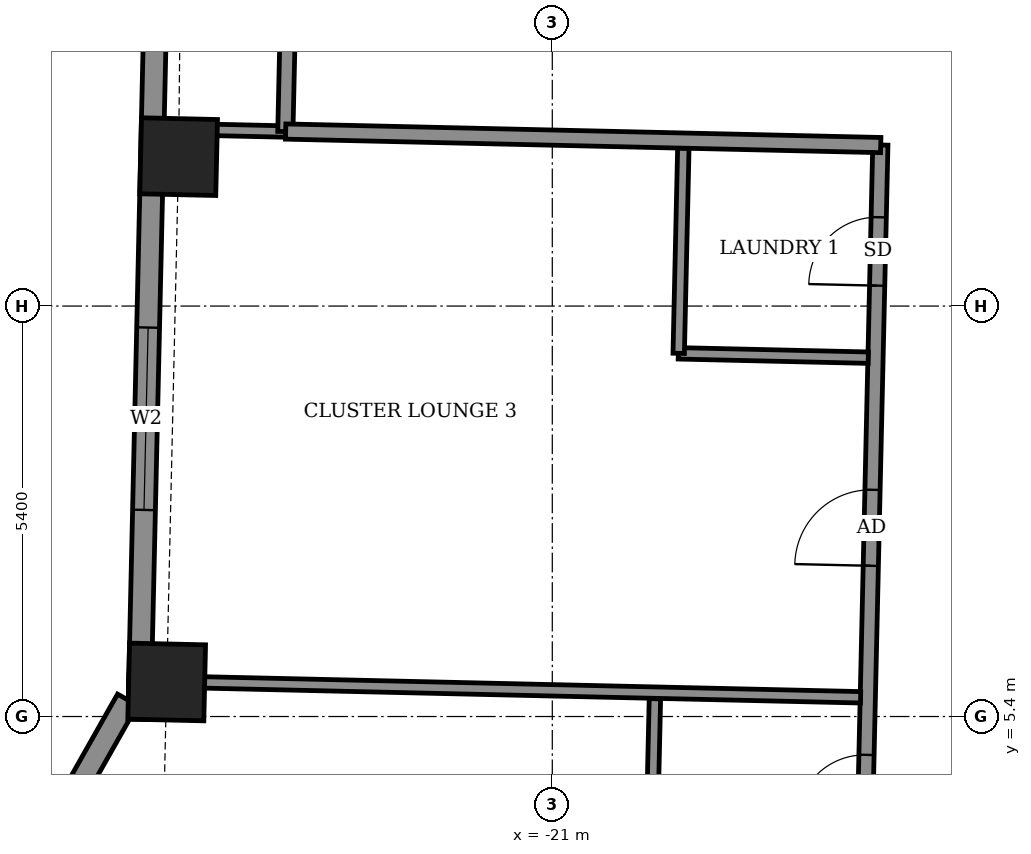
"""IFC4 building model, lengths in metres.
Left out: names, types, materials, properties, quantities, classifications, styles, units other than length and angle.
Written with IfcOpenShell. Run it as: python <this file> out.ifc"""

import sys

from ifc_helpers import new_model, si_unit, direction, frame, frame_2d, origin, origin_2d, place, context, subcontext, project, spatial, rectangle, extrude, element, fill, save


model = new_model("IFC4")
c1 = context("Model", 3, precision=1e-05, world=origin(), true_north=direction((0.0, 1.0)))
c2 = subcontext(c1, "Body", "Model", "MODEL_VIEW")
j1 = project(units=[si_unit("LENGTHUNIT", "METRE"), si_unit("PLANEANGLEUNIT", "RADIAN")], contexts=[c1])
p1 = place(None, origin())
s1 = spatial("IfcSite", under=j1, at=p1, CompositionType="ELEMENT")
p2 = place(p1, origin())
s2 = spatial("IfcBuilding", under=s1, at=p2, CompositionType="ELEMENT")
p3 = place(p2, frame((0.0, 0.0, 257.3)))
s3 = spatial("IfcBuildingStorey", under=s2, at=p3, CompositionType="ELEMENT", Elevation=257.3)
for number, where, z_axis, x_axis in (
    (1, (-25.916, 12.766, -0.55), (0.0, 0.0, 1.0), (-0.023, -1.0, 0.0)),
    (2, (-26.073, 5.855, -0.55), (0.0, 0.0, 1.0), (-0.023, -1.0, 0.0)),
):
    element("IfcColumn", number, at=place(p3, frame(where, z_axis=z_axis, x_axis=x_axis)), inside=s3, PredefinedType="COLUMN", context=c2, shape_type="SweptSolid", body=[
        extrude(rectangle(XDim=1.0, YDim=1.0, at=origin_2d()), origin(), (0.0, 0.0, 1.0), 3.6),
    ])
p4 = place(p3, frame((-26.113, 19.534, 0.0), z_axis=(0.0, 0.0, 1.0), x_axis=(-0.022649415303, -0.999743469089, 0.0)))
e3 = element("IfcWall", 3, at=p4, inside=s3, PredefinedType="SOLIDWALL", context=c2, shape_type="SweptSolid", body=[
    extrude(rectangle(XDim=14.175, YDim=0.3, at=frame_2d((7.087, 0.0))), origin(), (0.0, 0.0, 1.0), 2.55),
])
p5 = place(p4, frame((2.735, 0.0, 0.0)))
e4 = element("IfcOpeningElement", 4, at=p5, cuts=e3, PredefinedType="OPENING", context=c2, shape_type="SweptSolid", body=[
    extrude(rectangle(XDim=1.5, YDim=2.4, at=frame_2d((0.75, 1.2))), frame((0.0, 0.16, 0.0), z_axis=(0.0, -1.0, 0.0), x_axis=(1.0, 0.0, 0.0)), (0.0, 0.0, 1.0), 0.32),
])
p6 = place(p4, frame((9.019, 0.0, 0.9)))
e5 = element("IfcOpeningElement", 5, at=p6, cuts=e3, PredefinedType="OPENING", context=c2, shape_type="SweptSolid", body=[
    extrude(rectangle(XDim=2.4, YDim=1.5, at=frame_2d((1.2, 0.75))), frame((0.0, 0.16, 0.0), z_axis=(0.0, -1.0, 0.0), x_axis=(1.0, 0.0, 0.0)), (0.0, 0.0, 1.0), 0.32),
])
p7 = place(p3, frame((-26.589, 5.621, 0.0), z_axis=(0.0, 0.0, 1.0), x_axis=(-0.492495436053, -0.870315026566, 0.0)))
e6 = element("IfcWall", 6, at=p7, inside=s3, PredefinedType="SOLIDWALL", context=c2, shape_type="SweptSolid", body=[
    extrude(rectangle(XDim=5.397, YDim=0.3, at=frame_2d((2.698, 0.0))), origin(), (0.0, 0.0, 1.0), 3.05),
])
p8 = place(p7, frame((2.007, 0.0, 0.9)))
e7 = element("IfcOpeningElement", 7, at=p8, cuts=e6, PredefinedType="OPENING", context=c2, shape_type="SweptSolid", body=[
    extrude(rectangle(XDim=1.2, YDim=1.5, at=frame_2d((0.6, 0.75))), frame((0.0, 0.16, 0.0), z_axis=(0.0, -1.0, 0.0), x_axis=(1.0, 0.0, 0.0)), (0.0, 0.0, 1.0), 0.32),
])
p9 = place(p3, frame((-17.262, -12.525, 0.0), z_axis=(0.0, 0.0, 1.0), x_axis=(0.022706151961, 0.999742182097, 0.0)))
e8 = element("IfcWall", 8, at=p9, inside=s3, PredefinedType="PARTITIONING", context=c2, shape_type="SweptSolid", body=[
    extrude(rectangle(XDim=25.45, YDim=0.2, at=frame_2d((12.725, 0.0))), origin(), (0.0, 0.0, 1.0), 3.05),
])
p10 = place(p9, frame((19.913, 0.0, 0.0)))
e9 = element("IfcOpeningElement", 9, at=p10, cuts=e8, PredefinedType="OPENING", context=c2, shape_type="SweptSolid", body=[
    extrude(rectangle(XDim=1.0, YDim=2.1, at=frame_2d((0.5, 1.05))), frame((0.0, 0.11, 0.0), z_axis=(0.0, -1.0, 0.0), x_axis=(1.0, 0.0, 0.0)), (0.0, 0.0, 1.0), 0.22),
])
p11 = place(p9, frame((23.6, 0.0, 0.0)))
e10 = element("IfcOpeningElement", 10, at=p11, cuts=e8, PredefinedType="OPENING", context=c2, shape_type="SweptSolid", body=[
    extrude(rectangle(XDim=0.9, YDim=2.1, at=frame_2d((0.45, 1.05))), frame((0.0, 0.11, 0.0), z_axis=(0.0, -1.0, 0.0), x_axis=(1.0, 0.0, 0.0)), (0.0, 0.0, 1.0), 0.22),
])
p12 = place(p9, frame((14.05, 0.0, 0.0)))
e11 = element("IfcOpeningElement", 11, at=p12, cuts=e8, PredefinedType="OPENING", context=c2, shape_type="SweptSolid", body=[
    extrude(rectangle(XDim=1.0, YDim=2.1, at=frame_2d((0.5, 1.05))), frame((0.0, 0.11, 0.0), z_axis=(0.0, -1.0, 0.0), x_axis=(1.0, 0.0, 0.0)), (0.0, 0.0, 1.0), 0.22),
])
p13 = place(p9, frame((16.525, 0.0, 0.0)))
e12 = element("IfcOpeningElement", 12, at=p13, cuts=e8, PredefinedType="OPENING", context=c2, shape_type="SweptSolid", body=[
    extrude(rectangle(XDim=0.9, YDim=2.1, at=frame_2d((0.45, 1.05))), frame((0.0, 0.11, 0.0), z_axis=(0.0, -1.0, 0.0), x_axis=(1.0, 0.0, 0.0)), (0.0, 0.0, 1.0), 0.22),
])
p14 = place(p9, frame((11.825, 0.0, 0.0)))
e13 = element("IfcOpeningElement", 13, at=p14, cuts=e8, PredefinedType="OPENING", context=c2, shape_type="SweptSolid", body=[
    extrude(rectangle(XDim=1.0, YDim=2.1, at=frame_2d((0.5, 1.05))), frame((0.0, 0.11, 0.0), z_axis=(0.0, -1.0, 0.0), x_axis=(1.0, 0.0, 0.0)), (0.0, 0.0, 1.0), 0.22),
])
p15 = place(p9, frame((9.575, 0.0, 0.0)))
e14 = element("IfcOpeningElement", 14, at=p15, cuts=e8, PredefinedType="OPENING", context=c2, shape_type="SweptSolid", body=[
    extrude(rectangle(XDim=0.9, YDim=2.1, at=frame_2d((0.45, 1.05))), frame((0.0, 0.11, 0.0), z_axis=(0.0, -1.0, 0.0), x_axis=(1.0, 0.0, 0.0)), (0.0, 0.0, 1.0), 0.22),
])
p16 = place(p9, frame((6.155, 0.0, 0.0)))
e15 = element("IfcOpeningElement", 15, at=p16, cuts=e8, PredefinedType="OPENING", context=c2, shape_type="SweptSolid", body=[
    extrude(rectangle(XDim=1.0, YDim=2.1, at=frame_2d((0.5, 1.05))), frame((0.0, 0.11, 0.0), z_axis=(0.0, -1.0, 0.0), x_axis=(1.0, 0.0, 0.0)), (0.0, 0.0, 1.0), 0.22),
])
p17 = place(p9, frame((0.512, 0.0, 0.0)))
e16 = element("IfcOpeningElement", 16, at=p17, cuts=e8, PredefinedType="OPENING", context=c2, shape_type="SweptSolid", body=[
    extrude(rectangle(XDim=1.0, YDim=2.1, at=frame_2d((0.5, 1.05))), frame((0.0, 0.11, 0.0), z_axis=(0.0, -1.0, 0.0), x_axis=(1.0, 0.0, 0.0)), (0.0, 0.0, 1.0), 0.22),
])
p18 = place(p9, frame((2.775, 0.0, 0.0)))
e17 = element("IfcOpeningElement", 17, at=p18, cuts=e8, PredefinedType="OPENING", context=c2, shape_type="SweptSolid", body=[
    extrude(rectangle(XDim=0.9, YDim=2.1, at=frame_2d((0.45, 1.05))), frame((0.0, 0.11, 0.0), z_axis=(0.0, -1.0, 0.0), x_axis=(1.0, 0.0, 0.0)), (0.0, 0.0, 1.0), 0.22),
])
p19 = place(p3, frame((-19.703, 3.31, 0.0), z_axis=(0.0, 0.0, 1.0), x_axis=(0.02279059109, 0.999740260747, 0.0)))
e18 = element("IfcWall", 18, at=p19, inside=s3, PredefinedType="PARTITIONING", context=c2, shape_type="SweptSolid", body=[
    extrude(rectangle(XDim=2.324, YDim=0.15, at=frame_2d((1.162, 0.0))), origin(), (0.0, 0.0, 1.0), 3.05),
])
p20 = place(p3, frame((-26.573, 5.871, 0.0), z_axis=(0.0, 0.0, 1.0), x_axis=(0.999743768709, -0.022636186244, 0.0)))
e19 = element("IfcWall", 19, at=p20, inside=s3, PredefinedType="PARTITIONING", context=c2, shape_type="SweptSolid", body=[
    extrude(rectangle(XDim=9.631, YDim=0.15, at=frame_2d((4.816, 0.0))), origin(), (0.0, 0.0, 1.0), 3.05),
])
p21 = place(p3, frame((-19.342, 10.178, 0.0), z_axis=(0.0, 0.0, 1.0), x_axis=(0.999741028149, -0.022756903044, 0.0)))
e20 = element("IfcWall", 20, at=p21, inside=s3, PredefinedType="PARTITIONING", context=c2, shape_type="SweptSolid", body=[
    extrude(rectangle(XDim=2.5, YDim=0.15, at=frame_2d((1.25, 0.0))), origin(), (0.0, 0.0, 1.0), 3.05),
])
p22 = place(p3, frame((-19.337, 10.178, 0.0), z_axis=(0.0, 0.0, 1.0), x_axis=(0.02260842146, 0.999744396973, 0.0)))
e21 = element("IfcWall", 21, at=p22, inside=s3, PredefinedType="PARTITIONING", context=c2, shape_type="SweptSolid", body=[
    extrude(rectangle(XDim=2.7, YDim=0.15, at=frame_2d((1.35, 0.0))), origin(), (0.0, 0.0, 1.0), 3.05),
])
p23 = place(p3, frame((-26.108, 13.132, 0.0), z_axis=(0.0, 0.0, 1.0), x_axis=(0.999746371854, -0.022520922836, 0.0)))
e22 = element("IfcWall", 22, at=p23, inside=s3, PredefinedType="PARTITIONING", context=c2, shape_type="SweptSolid", body=[
    extrude(rectangle(XDim=1.604, YDim=0.15, at=frame_2d((0.802, 0.0))), origin(), (0.0, 0.0, 1.0), 3.05),
])
p24 = place(p3, frame((-24.512, 13.096, 0.0), z_axis=(0.0, 0.0, 1.0), x_axis=(0.022617910375, 0.999744182344, 0.0)))
e23 = element("IfcWall", 23, at=p24, inside=s3, PredefinedType="PARTITIONING", context=c2, shape_type="SweptSolid", body=[
    extrude(rectangle(XDim=1.5, YDim=0.2, at=frame_2d((0.75, 0.0))), origin(), (0.0, 0.0, 1.0), 3.05),
])
p25 = place(p3, frame((-24.508, 13.096, 0.0), z_axis=(0.0, 0.0, 1.0), x_axis=(0.99974170677, -0.022727070732, 0.0)))
e24 = element("IfcWall", 24, at=p25, inside=s3, PredefinedType="PARTITIONING", context=c2, shape_type="SweptSolid", body=[
    extrude(rectangle(XDim=7.831, YDim=0.2, at=frame_2d((3.916, 0.0))), origin(), (0.0, 0.0, 1.0), 3.05),
])
p26 = place(p3, frame((-24.474, 14.596, 0.0), z_axis=(0.0, 0.0, 1.0), x_axis=(0.999742424031, -0.022695497208, 0.0)))
e25 = element("IfcWall", 25, at=p26, inside=s3, PredefinedType="PARTITIONING", context=c2, shape_type="SweptSolid", body=[
    extrude(rectangle(XDim=52.872, YDim=0.2, at=frame_2d((26.436, 0.0))), origin(), (0.0, 0.0, 1.0), 3.05),
])
p27 = place(p26, frame((51.336, 0.0, 0.0)))
e26 = element("IfcOpeningElement", 26, at=p27, cuts=e25, PredefinedType="OPENING", context=c2, shape_type="SweptSolid", body=[
    extrude(rectangle(XDim=1.0, YDim=2.1, at=frame_2d((0.5, 1.05))), frame((0.0, 0.11, 0.0), z_axis=(0.0, -1.0, 0.0), x_axis=(1.0, 0.0, 0.0)), (0.0, 0.0, 1.0), 0.22),
])
p28 = place(p26, frame((47.25, 0.0, 0.0)))
e27 = element("IfcOpeningElement", 27, at=p28, cuts=e25, PredefinedType="OPENING", context=c2, shape_type="SweptSolid", body=[
    extrude(rectangle(XDim=0.9, YDim=2.1, at=frame_2d((0.45, 1.05))), frame((0.0, 0.11, 0.0), z_axis=(0.0, -1.0, 0.0), x_axis=(1.0, 0.0, 0.0)), (0.0, 0.0, 1.0), 0.22),
])
p29 = place(p26, frame((42.475, 0.0, 0.0)))
e28 = element("IfcOpeningElement", 28, at=p29, cuts=e25, PredefinedType="OPENING", context=c2, shape_type="SweptSolid", body=[
    extrude(rectangle(XDim=0.9, YDim=2.1, at=frame_2d((0.45, 1.05))), frame((0.0, 0.11, 0.0), z_axis=(0.0, -1.0, 0.0), x_axis=(1.0, 0.0, 0.0)), (0.0, 0.0, 1.0), 0.22),
])
p30 = place(p26, frame((40.15, 0.0, 0.0)))
e29 = element("IfcOpeningElement", 29, at=p30, cuts=e25, PredefinedType="OPENING", context=c2, shape_type="SweptSolid", body=[
    extrude(rectangle(XDim=0.9, YDim=2.1, at=frame_2d((0.45, 1.05))), frame((0.0, 0.11, 0.0), z_axis=(0.0, -1.0, 0.0), x_axis=(1.0, 0.0, 0.0)), (0.0, 0.0, 1.0), 0.22),
])
p31 = place(p26, frame((33.15, 0.0, 0.0)))
e30 = element("IfcOpeningElement", 30, at=p31, cuts=e25, PredefinedType="OPENING", context=c2, shape_type="SweptSolid", body=[
    extrude(rectangle(XDim=0.9, YDim=2.1, at=frame_2d((0.45, 1.05))), frame((0.0, 0.11, 0.0), z_axis=(0.0, -1.0, 0.0), x_axis=(1.0, 0.0, 0.0)), (0.0, 0.0, 1.0), 0.22),
])
p32 = place(p26, frame((30.95, 0.0, 0.0)))
e31 = element("IfcOpeningElement", 31, at=p32, cuts=e25, PredefinedType="OPENING", context=c2, shape_type="SweptSolid", body=[
    extrude(rectangle(XDim=0.9, YDim=2.1, at=frame_2d((0.45, 1.05))), frame((0.0, 0.11, 0.0), z_axis=(0.0, -1.0, 0.0), x_axis=(1.0, 0.0, 0.0)), (0.0, 0.0, 1.0), 0.22),
])
p33 = place(p26, frame((23.975, 0.0, 0.0)))
e32 = element("IfcOpeningElement", 32, at=p33, cuts=e25, PredefinedType="OPENING", context=c2, shape_type="SweptSolid", body=[
    extrude(rectangle(XDim=0.9, YDim=2.1, at=frame_2d((0.45, 1.05))), frame((0.0, 0.11, 0.0), z_axis=(0.0, -1.0, 0.0), x_axis=(1.0, 0.0, 0.0)), (0.0, 0.0, 1.0), 0.22),
])
p34 = place(p26, frame((21.925, 0.0, 0.0)))
e33 = element("IfcOpeningElement", 33, at=p34, cuts=e25, PredefinedType="OPENING", context=c2, shape_type="SweptSolid", body=[
    extrude(rectangle(XDim=0.9, YDim=2.1, at=frame_2d((0.45, 1.05))), frame((0.0, 0.11, 0.0), z_axis=(0.0, -1.0, 0.0), x_axis=(1.0, 0.0, 0.0)), (0.0, 0.0, 1.0), 0.22),
])
p35 = place(p26, frame((14.975, 0.0, 0.0)))
e34 = element("IfcOpeningElement", 34, at=p35, cuts=e25, PredefinedType="OPENING", context=c2, shape_type="SweptSolid", body=[
    extrude(rectangle(XDim=0.9, YDim=2.1, at=frame_2d((0.45, 1.05))), frame((0.0, 0.11, 0.0), z_axis=(0.0, -1.0, 0.0), x_axis=(1.0, 0.0, 0.0)), (0.0, 0.0, 1.0), 0.22),
])
p36 = place(p26, frame((12.65, 0.0, 0.0)))
e35 = element("IfcOpeningElement", 35, at=p36, cuts=e25, PredefinedType="OPENING", context=c2, shape_type="SweptSolid", body=[
    extrude(rectangle(XDim=0.9, YDim=2.1, at=frame_2d((0.45, 1.05))), frame((0.0, 0.11, 0.0), z_axis=(0.0, -1.0, 0.0), x_axis=(1.0, 0.0, 0.0)), (0.0, 0.0, 1.0), 0.22),
])
p37 = place(p26, frame((2.0, 0.0, 0.0)))
e36 = element("IfcOpeningElement", 36, at=p37, cuts=e25, PredefinedType="OPENING", context=c2, shape_type="SweptSolid", body=[
    extrude(rectangle(XDim=1.0, YDim=2.1, at=frame_2d((0.5, 1.05))), frame((0.0, 0.11, 0.0), z_axis=(0.0, -1.0, 0.0), x_axis=(1.0, 0.0, 0.0)), (0.0, 0.0, 1.0), 0.22),
])
p38 = place(p26, frame((7.75, 0.0, 0.0)))
e37 = element("IfcOpeningElement", 37, at=p38, cuts=e25, PredefinedType="OPENING", context=c2, shape_type="SweptSolid", body=[
    extrude(rectangle(XDim=0.9, YDim=2.1, at=frame_2d((0.45, 1.05))), frame((0.0, 0.11, 0.0), z_axis=(0.0, -1.0, 0.0), x_axis=(1.0, 0.0, 0.0)), (0.0, 0.0, 1.0), 0.22),
])
p39 = place(p6, origin())
e38 = element("IfcWindow", 38, at=p39, inside=s3, PartitioningType="DOUBLE_PANEL_VERTICAL", PredefinedType="WINDOW", context=c2, shape_type="SweptSolid", body=[
    extrude(rectangle(XDim=2.4, YDim=1.5, at=frame_2d((1.2, 0.75))), frame((0.0, 0.03, 0.0), z_axis=(0.0, -1.0, 0.0), x_axis=(1.0, 0.0, 0.0)), (0.0, 0.0, 1.0), 0.06),
])
fill(e5, e38)
p40 = place(p10, origin())
e39 = element("IfcDoor", 39, at=p40, inside=s3, OperationType="SINGLE_SWING_LEFT", PredefinedType="DOOR", context=c2, shape_type="SweptSolid", body=[
    extrude(rectangle(XDim=1.0, YDim=2.1, at=frame_2d((0.5, 1.05))), frame((0.0, 0.025, 0.0), z_axis=(0.0, -1.0, 0.0), x_axis=(1.0, 0.0, 0.0)), (0.0, 0.0, 1.0), 0.05),
])
fill(e9, e39)
p41 = place(p11, origin())
e40 = element("IfcDoor", 40, at=p41, inside=s3, OperationType="SINGLE_SWING_LEFT", PredefinedType="DOOR", context=c2, shape_type="SweptSolid", body=[
    extrude(rectangle(XDim=0.9, YDim=2.1, at=frame_2d((0.45, 1.05))), frame((0.0, 0.025, 0.0), z_axis=(0.0, -1.0, 0.0), x_axis=(1.0, 0.0, 0.0)), (0.0, 0.0, 1.0), 0.05),
])
fill(e10, e40)
p42 = place(p13, origin())
e41 = element("IfcDoor", 41, at=p42, inside=s3, OperationType="SINGLE_SWING_RIGHT", PredefinedType="DOOR", context=c2, shape_type="SweptSolid", body=[
    extrude(rectangle(XDim=0.9, YDim=2.1, at=frame_2d((0.45, 1.05))), frame((0.0, 0.025, 0.0), z_axis=(0.0, -1.0, 0.0), x_axis=(1.0, 0.0, 0.0)), (0.0, 0.0, 1.0), 0.05),
])
fill(e12, e41)
save(model, sys.argv[1])
